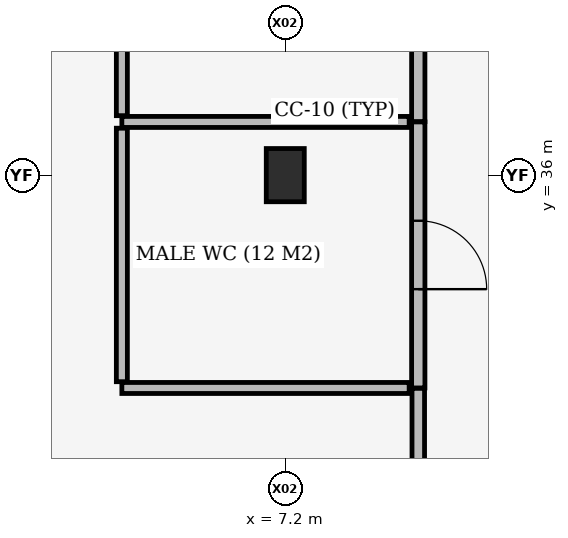
"""IFC4 building model, lengths in metres.
Left out: names, types, materials, properties, quantities, classifications, styles, units other than length and angle.
Written with IfcOpenShell. Run it as: python <this file> out.ifc"""

import sys

from ifc_helpers import new_model, si_unit, direction, frame, frame_2d, origin, origin_2d, place, context, subcontext, project, spatial, rectangle, extrude, element, fill, save


model = new_model("IFC4")
c1 = context("Model", 3, precision=1e-05, world=origin(), true_north=direction((0.0, 1.0)))
c2 = subcontext(c1, "Body", "Model", "MODEL_VIEW")
j1 = project(units=[si_unit("LENGTHUNIT", "METRE"), si_unit("PLANEANGLEUNIT", "RADIAN")], contexts=[c1])
p1 = place(None, origin())
s1 = spatial("IfcSite", under=j1, at=p1, CompositionType="ELEMENT")
p2 = place(p1, origin())
s2 = spatial("IfcBuilding", under=s1, at=p2, CompositionType="ELEMENT")
p3 = place(p2, origin())
s3 = spatial("IfcBuildingStorey", under=s2, at=p3, CompositionType="ELEMENT", Elevation=0.0)
p4 = place(p3, frame((7.2, 36.0, 0.0), z_axis=(0.0, 0.0, 1.0), x_axis=(1.0, 0.0, 0.0)))
e1 = element("IfcColumn", 1, at=p4, inside=s3, PredefinedType="COLUMN", context=c2, shape_type="SweptSolid", body=[
    extrude(rectangle(XDim=0.5, YDim=0.7, at=origin_2d()), origin(), (0.0, 0.0, 1.0), 5.1),
])
p5 = place(p3, frame((8.95, 33.2, 0.0), z_axis=(0.0, 0.0, 1.0), x_axis=(0.0, 1.0, 0.0)))
e2 = element("IfcWall", 2, at=p5, inside=s3, PredefinedType="PLUMBINGWALL", context=c2, shape_type="SweptSolid", body=[
    extrude(rectangle(XDim=3.5, YDim=0.175, at=frame_2d((1.75, 0.0))), origin(), (0.0, 0.0, 1.0), 4.35),
])
p6 = place(p5, frame((1.3, 0.0, 0.0)))
e3 = element("IfcOpeningElement", 3, at=p6, cuts=e2, PredefinedType="OPENING", context=c2, shape_type="SweptSolid", body=[
    extrude(rectangle(XDim=0.9, YDim=2.1, at=frame_2d((0.45, 1.05))), frame((0.0, 0.097, 0.0), z_axis=(0.0, -1.0, 0.0), x_axis=(1.0, 0.0, 0.0)), (0.0, 0.0, 1.0), 0.195),
])
p7 = place(p3, frame((5.05, 33.2, 0.0), z_axis=(0.0, 0.0, 1.0), x_axis=(1.0, 0.0, 0.0)))
e4 = element("IfcWall", 4, at=p7, inside=s3, PredefinedType="PLUMBINGWALL", context=c2, shape_type="SweptSolid", body=[
    extrude(rectangle(XDim=3.78, YDim=0.145, at=frame_2d((1.89, 0.0))), origin(), (0.0, 0.0, 1.0), 4.3),
])
p8 = place(p3, frame((5.05, 36.7, 0.0), z_axis=(0.0, 0.0, 1.0), x_axis=(1.0, 0.0, 0.0)))
e5 = element("IfcWall", 5, at=p8, inside=s3, PredefinedType="PLUMBINGWALL", context=c2, shape_type="SweptSolid", body=[
    extrude(rectangle(XDim=3.78, YDim=0.145, at=frame_2d((1.89, 0.0))), origin(), (0.0, 0.0, 1.0), 4.5),
])
p9 = place(p3, frame((5.05, 33.282, 0.0), z_axis=(0.0, 0.0, 1.0), x_axis=(0.0, 1.0, 0.0)))
e6 = element("IfcWall", 6, at=p9, inside=s3, PredefinedType="PLUMBINGWALL", context=c2, shape_type="SweptSolid", body=[
    extrude(rectangle(XDim=3.335, YDim=0.145, at=frame_2d((1.667, 0.0))), origin(), (0.0, 0.0, 1.0), 4.4),
])
p10 = place(p3, frame((8.95, 36.705, 0.0), z_axis=(0.0, 0.0, 1.0), x_axis=(0.0, 1.0, 0.0)))
e7 = element("IfcWall", 7, at=p10, inside=s3, PredefinedType="PLUMBINGWALL", context=c2, shape_type="SweptSolid", body=[
    extrude(rectangle(XDim=3.495, YDim=0.175, at=frame_2d((1.748, 0.0))), origin(), (0.0, 0.0, 1.0), 5.1),
])
p11 = place(p10, frame((1.298, 0.0, 0.0)))
e8 = element("IfcOpeningElement", 8, at=p11, cuts=e7, PredefinedType="OPENING", context=c2, shape_type="SweptSolid", body=[
    extrude(rectangle(XDim=0.9, YDim=2.1, at=frame_2d((0.45, 1.05))), frame((0.0, 0.097, 0.0), z_axis=(0.0, -1.0, 0.0), x_axis=(1.0, 0.0, 0.0)), (0.0, 0.0, 1.0), 0.195),
])
p12 = place(p3, frame((5.05, 36.782, 0.0), z_axis=(0.0, 0.0, 1.0), x_axis=(0.0, 1.0, 0.0)))
e9 = element("IfcWall", 9, at=p12, inside=s3, PredefinedType="PLUMBINGWALL", context=c2, shape_type="SweptSolid", body=[
    extrude(rectangle(XDim=3.335, YDim=0.145, at=frame_2d((1.667, 0.0))), origin(), (0.0, 0.0, 1.0), 5.1),
])
p13 = place(p3, frame((8.95, 23.0, 0.0), z_axis=(0.0, 0.0, 1.0), x_axis=(0.0, 1.0, 0.0)))
e10 = element("IfcWall", 10, at=p13, inside=s3, PredefinedType="PARTITIONING", context=c2, shape_type="SweptSolid", body=[
    extrude(rectangle(XDim=10.195, YDim=0.165, at=frame_2d((5.098, 0.0))), origin(), (0.0, 0.0, 1.0), 4.4),
])
p14 = place(p13, frame((4.573, 0.0, 0.0)))
e11 = element("IfcOpeningElement", 11, at=p14, cuts=e10, PredefinedType="OPENING", context=c2, shape_type="SweptSolid", body=[
    extrude(rectangle(XDim=1.05, YDim=2.2, at=frame_2d((0.525, 1.1))), frame((0.0, 0.093, 0.0), z_axis=(0.0, -1.0, 0.0), x_axis=(1.0, 0.0, 0.0)), (0.0, 0.0, 1.0), 0.185),
])
p15 = place(p6, origin())
e12 = element("IfcDoor", 12, at=p15, inside=s3, OperationType="SINGLE_SWING_RIGHT", PredefinedType="DOOR", context=c2, shape_type="SweptSolid", body=[
    extrude(rectangle(XDim=0.9, YDim=2.1, at=frame_2d((0.45, 1.05))), frame((0.0, 0.025, 0.0), z_axis=(0.0, -1.0, 0.0), x_axis=(1.0, 0.0, 0.0)), (0.0, 0.0, 1.0), 0.05),
])
fill(e3, e12)
save(model, sys.argv[1])
